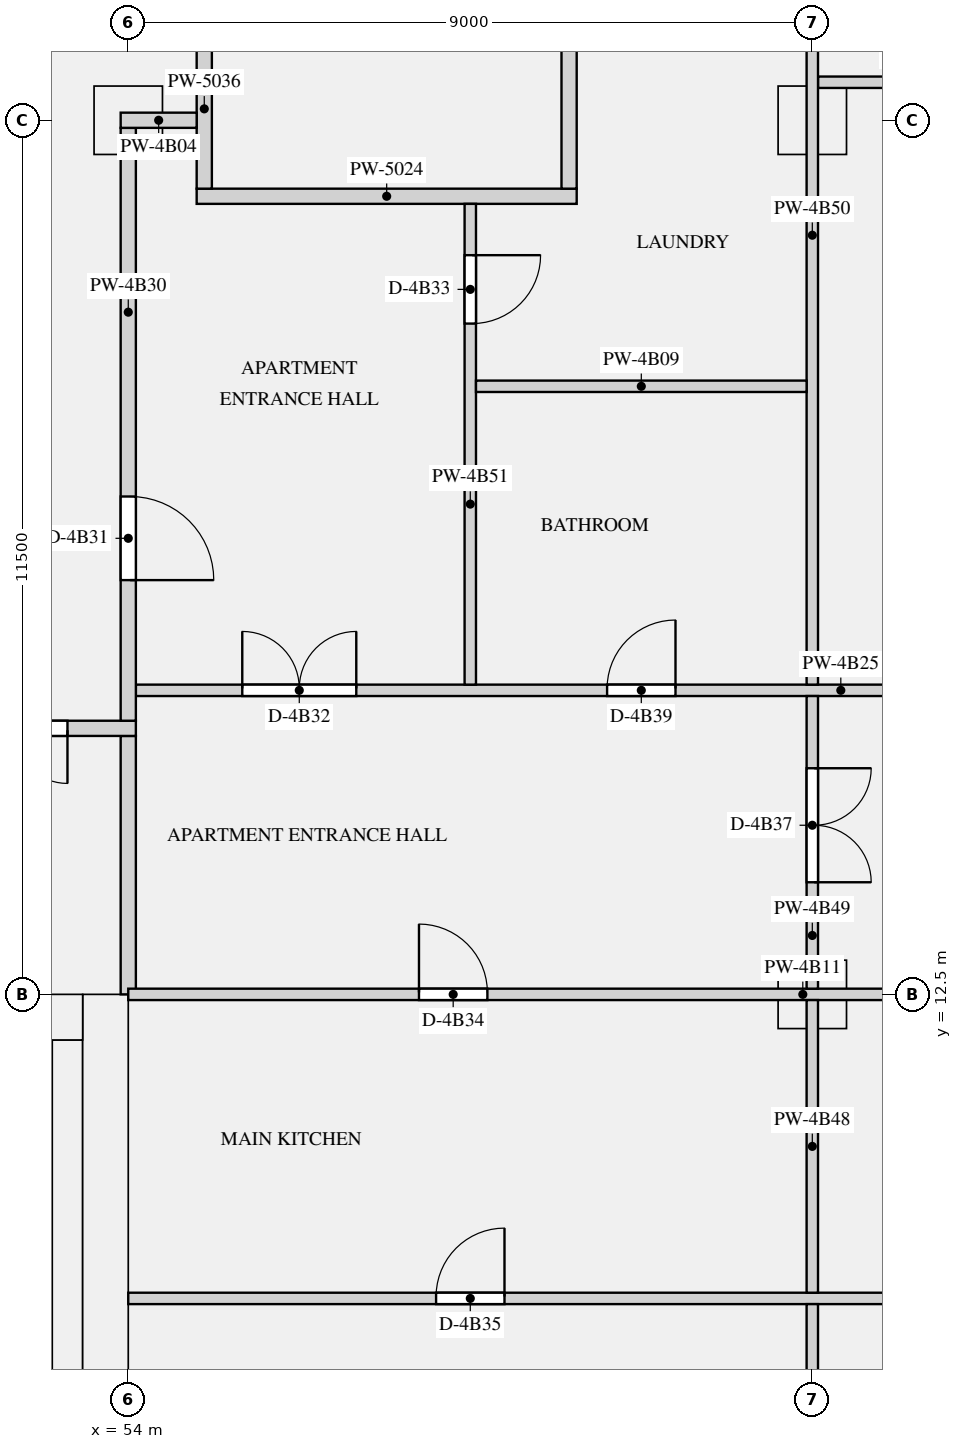
"""IFC4 building model, lengths in metres.
Left out: names, types, materials, properties, quantities, classifications, styles, units other than length and angle.
Written with IfcOpenShell. Run it as: python <this file> out.ifc"""

import sys

from ifc_helpers import new_model, si_unit, direction, frame, frame_2d, origin, origin_2d, place, context, subcontext, project, spatial, rectangle, extrude, element, fill, save


model = new_model("IFC4")
c1 = context("Model", 3, precision=1e-05, world=origin(), true_north=direction((0.0, 1.0)))
c2 = subcontext(c1, "Body", "Model", "MODEL_VIEW")
j1 = project(units=[si_unit("LENGTHUNIT", "METRE"), si_unit("PLANEANGLEUNIT", "RADIAN")], contexts=[c1])
p1 = place(None, origin())
s1 = spatial("IfcSite", under=j1, at=p1, CompositionType="ELEMENT")
p2 = place(p1, origin())
s2 = spatial("IfcBuilding", under=s1, at=p2, CompositionType="ELEMENT")
p3 = place(p2, frame((0.0, 0.0, 207.45)))
s3 = spatial("IfcBuildingStorey", under=s2, at=p3, CompositionType="ELEMENT", Elevation=207.45)
for number, where, z_axis, x_axis in (
    (1, (54.0, 24.0, 0.0), (0.0, 0.0, 1.0), (1.0, 0.0, 0.0)),
    (2, (63.0, 24.0, 0.0), (0.0, 0.0, 1.0), (1.0, 0.0, 0.0)),
    (3, (63.0, 12.5, 0.0), (0.0, 0.0, 1.0), (1.0, 0.0, 0.0)),
):
    element("IfcColumn", number, at=place(p3, frame(where, z_axis=z_axis, x_axis=x_axis)), inside=s3, PredefinedType="COLUMN", context=c2, shape_type="SweptSolid", body=[
        extrude(rectangle(XDim=0.9, YDim=0.9, at=origin_2d()), origin(), (0.0, 0.0, 1.0), 3.15),
    ])
p4 = place(p3, frame((53.7, 0.0, 0.0), z_axis=(0.0, 0.0, 1.0), x_axis=(0.0, 1.0, 0.0)))
e4 = element("IfcWall", 4, at=p4, inside=s3, PredefinedType="SHEAR", context=c2, shape_type="SweptSolid", body=[
    extrude(rectangle(XDim=12.5, YDim=0.6, at=frame_2d((6.25, 0.0))), origin(), (0.0, 0.0, 1.0), 3.15),
])
p5 = place(p3, frame((18.6, 12.2, 0.0), z_axis=(0.0, 0.0, 1.0), x_axis=(1.0, 0.0, 0.0)))
e5 = element("IfcWall", 5, at=p5, inside=s3, PredefinedType="SHEAR", context=c2, shape_type="SweptSolid", body=[
    extrude(rectangle(XDim=34.8, YDim=0.6, at=frame_2d((17.4, 0.0))), origin(), (0.0, 0.0, 1.0), 3.15),
])
p6 = place(p5, frame((24.575, 0.0, 0.0)))
e6 = element("IfcOpeningElement", 6, at=p6, cuts=e5, PredefinedType="OPENING", context=c2, shape_type="SweptSolid", body=[
    extrude(rectangle(XDim=1.1, YDim=2.1, at=frame_2d((0.55, 1.05))), frame((0.0, 0.31, 0.0), z_axis=(0.0, -1.0, 0.0), x_axis=(1.0, 0.0, 0.0)), (0.0, 0.0, 1.0), 0.62),
])
p7 = place(p5, frame((26.825, 0.0, 0.0)))
e7 = element("IfcOpeningElement", 7, at=p7, cuts=e5, PredefinedType="OPENING", context=c2, shape_type="SweptSolid", body=[
    extrude(rectangle(XDim=1.1, YDim=2.1, at=frame_2d((0.55, 1.05))), frame((0.0, 0.31, 0.0), z_axis=(0.0, -1.0, 0.0), x_axis=(1.0, 0.0, 0.0)), (0.0, 0.0, 1.0), 0.62),
])
p8 = place(p5, frame((29.075, 0.0, 0.0)))
e8 = element("IfcOpeningElement", 8, at=p8, cuts=e5, PredefinedType="OPENING", context=c2, shape_type="SweptSolid", body=[
    extrude(rectangle(XDim=1.1, YDim=2.1, at=frame_2d((0.55, 1.05))), frame((0.0, 0.31, 0.0), z_axis=(0.0, -1.0, 0.0), x_axis=(1.0, 0.0, 0.0)), (0.0, 0.0, 1.0), 0.62),
])
p9 = place(p5, frame((4.95, 0.0, 0.0)))
e9 = element("IfcOpeningElement", 9, at=p9, cuts=e5, PredefinedType="OPENING", context=c2, shape_type="SweptSolid", body=[
    extrude(rectangle(XDim=0.9, YDim=2.1, at=frame_2d((0.45, 1.05))), frame((0.0, 0.31, 0.0), z_axis=(0.0, -1.0, 0.0), x_axis=(1.0, 0.0, 0.0)), (0.0, 0.0, 1.0), 0.62),
])
p10 = place(p5, frame((13.95, 0.0, 0.0)))
e10 = element("IfcOpeningElement", 10, at=p10, cuts=e5, PredefinedType="OPENING", context=c2, shape_type="SweptSolid", body=[
    extrude(rectangle(XDim=0.9, YDim=2.1, at=frame_2d((0.45, 1.05))), frame((0.0, 0.31, 0.0), z_axis=(0.0, -1.0, 0.0), x_axis=(1.0, 0.0, 0.0)), (0.0, 0.0, 1.0), 0.62),
])
p11 = place(p5, frame((18.45, 0.0, 0.0)))
e11 = element("IfcOpeningElement", 11, at=p11, cuts=e5, PredefinedType="OPENING", context=c2, shape_type="SweptSolid", body=[
    extrude(rectangle(XDim=0.9, YDim=2.1, at=frame_2d((0.45, 1.05))), frame((0.0, 0.31, 0.0), z_axis=(0.0, -1.0, 0.0), x_axis=(1.0, 0.0, 0.0)), (0.0, 0.0, 1.0), 0.62),
])
p12 = place(p5, frame((1.55, 0.0, 0.0)))
e12 = element("IfcOpeningElement", 12, at=p12, cuts=e5, PredefinedType="OPENING", context=c2, shape_type="SweptSolid", body=[
    extrude(rectangle(XDim=1.2, YDim=2.1, at=frame_2d((0.6, 1.05))), frame((0.0, 0.31, 0.0), z_axis=(0.0, -1.0, 0.0), x_axis=(1.0, 0.0, 0.0)), (0.0, 0.0, 1.0), 0.62),
])
p13 = place(p5, frame((32.05, 0.0, 0.0)))
e13 = element("IfcOpeningElement", 13, at=p13, cuts=e5, PredefinedType="OPENING", context=c2, shape_type="SweptSolid", body=[
    extrude(rectangle(XDim=1.2, YDim=2.1, at=frame_2d((0.6, 1.05))), frame((0.0, 0.31, 0.0), z_axis=(0.0, -1.0, 0.0), x_axis=(1.0, 0.0, 0.0)), (0.0, 0.0, 1.0), 0.62),
])
p14 = place(p3, frame((53.2, 1.0, 0.0), z_axis=(0.0, 0.0, 1.0), x_axis=(0.0, 1.0, 0.0)))
e14 = element("IfcWall", 14, at=p14, inside=s3, PredefinedType="SHEAR", context=c2, shape_type="SweptSolid", body=[
    extrude(rectangle(XDim=10.9, YDim=0.4, at=frame_2d((5.45, 0.0))), origin(), (0.0, 0.0, 1.0), 3.15),
])
p15 = place(p3, frame((54.9, 23.0, 0.0), z_axis=(0.0, 0.0, 1.0), x_axis=(1.0, 0.0, 0.0)))
e15 = element("IfcWall", 15, at=p15, inside=s3, PredefinedType="PARTITIONING", context=c2, shape_type="SweptSolid", body=[
    extrude(rectangle(XDim=5.0, YDim=0.2, at=frame_2d((2.5, 0.0))), origin(), (0.0, 0.0, 1.0), 2.83),
])
p16 = place(p3, frame((54.0, 12.5, 0.0), z_axis=(0.0, 0.0, 1.0), x_axis=(0.0, 1.0, 0.0)))
e16 = element("IfcWall", 16, at=p16, inside=s3, PredefinedType="PARTITIONING", context=c2, shape_type="SweptSolid", body=[
    extrude(rectangle(XDim=3.4, YDim=0.2, at=frame_2d((1.7, 0.0))), origin(), (0.0, 0.0, 1.0), 2.83),
])
p17 = place(p3, frame((55.0, 23.1, 0.0), z_axis=(0.0, 0.0, 1.0), x_axis=(0.0, 1.0, 0.0)))
e17 = element("IfcWall", 17, at=p17, inside=s3, PredefinedType="PARTITIONING", context=c2, shape_type="SweptSolid", body=[
    extrude(rectangle(XDim=3.8, YDim=0.2, at=frame_2d((1.9, 0.0))), origin(), (0.0, 0.0, 1.0), 2.83),
])
p18 = place(p17, frame((2.1, 0.0, 0.0)))
e18 = element("IfcOpeningElement", 18, at=p18, cuts=e17, PredefinedType="OPENING", context=c2, shape_type="SweptSolid", body=[
    extrude(rectangle(XDim=1.2, YDim=2.1, at=frame_2d((0.6, 1.05))), frame((0.0, 0.11, 0.0), z_axis=(0.0, -1.0, 0.0), x_axis=(1.0, 0.0, 0.0)), (0.0, 0.0, 1.0), 0.22),
])
p19 = place(p3, frame((59.8, 23.1, 0.0), z_axis=(0.0, 0.0, 1.0), x_axis=(0.0, 1.0, 0.0)))
e19 = element("IfcWall", 19, at=p19, inside=s3, PredefinedType="PARTITIONING", context=c2, shape_type="SweptSolid", body=[
    extrude(rectangle(XDim=3.9, YDim=0.2, at=frame_2d((1.95, 0.0))), origin(), (0.0, 0.0, 1.0), 2.83),
])
p20 = place(p3, frame((53.9, 24.0, 0.0), z_axis=(0.0, 0.0, 1.0), x_axis=(1.0, 0.0, 0.0)))
e20 = element("IfcWall", 20, at=p20, inside=s3, PredefinedType="PARTITIONING", context=c2, shape_type="SweptSolid", body=[
    extrude(rectangle(XDim=1.0, YDim=0.2, at=frame_2d((0.5, 0.0))), origin(), (0.0, 0.0, 1.0), 2.83),
])
p21 = place(p3, frame((58.575, 20.5, 0.0), z_axis=(0.0, 0.0, 1.0), x_axis=(1.0, 0.0, 0.0)))
e21 = element("IfcWall", 21, at=p21, inside=s3, PredefinedType="PARTITIONING", context=c2, shape_type="SweptSolid", body=[
    extrude(rectangle(XDim=4.35, YDim=0.15, at=frame_2d((2.175, 0.0))), origin(), (0.0, 0.0, 1.0), 2.83),
])
p22 = place(p3, frame((54.0, 12.5, 0.0), z_axis=(0.0, 0.0, 1.0), x_axis=(1.0, 0.0, 0.0)))
e22 = element("IfcWall", 22, at=p22, inside=s3, PredefinedType="PARTITIONING", context=c2, shape_type="SweptSolid", body=[
    extrude(rectangle(XDim=17.35, YDim=0.15, at=frame_2d((8.675, 0.0))), origin(), (0.0, 0.0, 1.0), 2.83),
])
p23 = place(p22, frame((3.825, 0.0, 0.0)))
e23 = element("IfcOpeningElement", 23, at=p23, cuts=e22, PredefinedType="OPENING", context=c2, shape_type="SweptSolid", body=[
    extrude(rectangle(XDim=0.9, YDim=2.1, at=frame_2d((0.45, 1.05))), frame((0.0, 0.085, 0.0), z_axis=(0.0, -1.0, 0.0), x_axis=(1.0, 0.0, 0.0)), (0.0, 0.0, 1.0), 0.17),
])
p24 = place(p22, frame((13.025, 0.0, 0.0)))
e24 = element("IfcOpeningElement", 24, at=p24, cuts=e22, PredefinedType="OPENING", context=c2, shape_type="SweptSolid", body=[
    extrude(rectangle(XDim=0.9, YDim=2.1, at=frame_2d((0.45, 1.05))), frame((0.0, 0.085, 0.0), z_axis=(0.0, -1.0, 0.0), x_axis=(1.0, 0.0, 0.0)), (0.0, 0.0, 1.0), 0.17),
])
p25 = place(p3, frame((54.0, 8.5, 0.0), z_axis=(0.0, 0.0, 1.0), x_axis=(1.0, 0.0, 0.0)))
e25 = element("IfcWall", 25, at=p25, inside=s3, PredefinedType="PARTITIONING", context=c2, shape_type="SweptSolid", body=[
    extrude(rectangle(XDim=17.35, YDim=0.15, at=frame_2d((8.675, 0.0))), origin(), (0.0, 0.0, 1.0), 2.83),
])
p26 = place(p25, frame((4.05, 0.0, 0.0)))
e26 = element("IfcOpeningElement", 26, at=p26, cuts=e25, PredefinedType="OPENING", context=c2, shape_type="SweptSolid", body=[
    extrude(rectangle(XDim=0.9, YDim=2.1, at=frame_2d((0.45, 1.05))), frame((0.0, 0.085, 0.0), z_axis=(0.0, -1.0, 0.0), x_axis=(1.0, 0.0, 0.0)), (0.0, 0.0, 1.0), 0.17),
])
p27 = place(p3, frame((54.1, 16.5, 0.0), z_axis=(0.0, 0.0, 1.0), x_axis=(1.0, 0.0, 0.0)))
e27 = element("IfcWall", 27, at=p27, inside=s3, PredefinedType="PARTITIONING", context=c2, shape_type="SweptSolid", body=[
    extrude(rectangle(XDim=14.75, YDim=0.15, at=frame_2d((7.375, 0.0))), origin(), (0.0, 0.0, 1.0), 2.83),
])
p28 = place(p27, frame((1.4, 0.0, 0.0)))
e28 = element("IfcOpeningElement", 28, at=p28, cuts=e27, PredefinedType="OPENING", context=c2, shape_type="SweptSolid", body=[
    extrude(rectangle(XDim=1.5, YDim=2.1, at=frame_2d((0.75, 1.05))), frame((0.0, 0.085, 0.0), z_axis=(0.0, -1.0, 0.0), x_axis=(1.0, 0.0, 0.0)), (0.0, 0.0, 1.0), 0.17),
])
p29 = place(p27, frame((6.2, 0.0, 0.0)))
e29 = element("IfcOpeningElement", 29, at=p29, cuts=e27, PredefinedType="OPENING", context=c2, shape_type="SweptSolid", body=[
    extrude(rectangle(XDim=0.9, YDim=2.1, at=frame_2d((0.45, 1.05))), frame((0.0, 0.085, 0.0), z_axis=(0.0, -1.0, 0.0), x_axis=(1.0, 0.0, 0.0)), (0.0, 0.0, 1.0), 0.17),
])
p30 = place(p27, frame((11.45, 0.0, 0.0)))
e30 = element("IfcOpeningElement", 30, at=p30, cuts=e27, PredefinedType="OPENING", context=c2, shape_type="SweptSolid", body=[
    extrude(rectangle(XDim=0.9, YDim=2.1, at=frame_2d((0.45, 1.05))), frame((0.0, 0.085, 0.0), z_axis=(0.0, -1.0, 0.0), x_axis=(1.0, 0.0, 0.0)), (0.0, 0.0, 1.0), 0.17),
])
p31 = place(p3, frame((63.075, 24.5, 0.0), z_axis=(0.0, 0.0, 1.0), x_axis=(1.0, 0.0, 0.0)))
e31 = element("IfcWall", 31, at=p31, inside=s3, PredefinedType="PARTITIONING", context=c2, shape_type="SweptSolid", body=[
    extrude(rectangle(XDim=5.775, YDim=0.15, at=frame_2d((2.888, 0.0))), origin(), (0.0, 0.0, 1.0), 2.83),
])
p32 = place(p31, frame((2.7, 0.0, 0.0)))
e32 = element("IfcOpeningElement", 32, at=p32, cuts=e31, PredefinedType="OPENING", context=c2, shape_type="SweptSolid", body=[
    extrude(rectangle(XDim=0.9, YDim=2.1, at=frame_2d((0.45, 1.05))), frame((0.0, 0.085, 0.0), z_axis=(0.0, -1.0, 0.0), x_axis=(1.0, 0.0, 0.0)), (0.0, 0.0, 1.0), 0.17),
])
p33 = place(p3, frame((17.9, 16.0, 0.0), z_axis=(0.0, 0.0, 1.0), x_axis=(1.0, 0.0, 0.0)))
e33 = element("IfcWall", 33, at=p33, inside=s3, PredefinedType="PARTITIONING", context=c2, shape_type="SweptSolid", body=[
    extrude(rectangle(XDim=36.2, YDim=0.2, at=frame_2d((18.1, 0.0))), origin(), (0.0, 0.0, 1.0), 2.83),
])
p34 = place(p33, frame((0.9, 0.0, 0.0)))
e34 = element("IfcOpeningElement", 34, at=p34, cuts=e33, PredefinedType="OPENING", context=c2, shape_type="SweptSolid", body=[
    extrude(rectangle(XDim=1.4, YDim=2.1, at=frame_2d((0.7, 1.05))), frame((0.0, 0.11, 0.0), z_axis=(0.0, -1.0, 0.0), x_axis=(1.0, 0.0, 0.0)), (0.0, 0.0, 1.0), 0.22),
])
p35 = place(p33, frame((33.9, 0.0, 0.0)))
e35 = element("IfcOpeningElement", 35, at=p35, cuts=e33, PredefinedType="OPENING", context=c2, shape_type="SweptSolid", body=[
    extrude(rectangle(XDim=1.4, YDim=2.1, at=frame_2d((0.7, 1.05))), frame((0.0, 0.11, 0.0), z_axis=(0.0, -1.0, 0.0), x_axis=(1.0, 0.0, 0.0)), (0.0, 0.0, 1.0), 0.22),
])
p36 = place(p3, frame((54.0, 16.1, 0.0), z_axis=(0.0, 0.0, 1.0), x_axis=(0.0, 1.0, 0.0)))
e36 = element("IfcWall", 36, at=p36, inside=s3, PredefinedType="PARTITIONING", context=c2, shape_type="SweptSolid", body=[
    extrude(rectangle(XDim=7.8, YDim=0.2, at=frame_2d((3.9, 0.0))), origin(), (0.0, 0.0, 1.0), 2.83),
])
p37 = place(p36, frame((1.85, 0.0, 0.0)))
e37 = element("IfcOpeningElement", 37, at=p37, cuts=e36, PredefinedType="OPENING", context=c2, shape_type="SweptSolid", body=[
    extrude(rectangle(XDim=1.1, YDim=2.1, at=frame_2d((0.55, 1.05))), frame((0.0, 0.11, 0.0), z_axis=(0.0, -1.0, 0.0), x_axis=(1.0, 0.0, 0.0)), (0.0, 0.0, 1.0), 0.22),
])
p38 = place(p3, frame((63.0, 0.65, 0.0), z_axis=(0.0, 0.0, 1.0), x_axis=(0.0, 1.0, 0.0)))
e38 = element("IfcWall", 38, at=p38, inside=s3, PredefinedType="PARTITIONING", context=c2, shape_type="SweptSolid", body=[
    extrude(rectangle(XDim=7.775, YDim=0.15, at=frame_2d((3.888, 0.0))), origin(), (0.0, 0.0, 1.0), 2.83),
])
p39 = place(p38, frame((3.1, 0.0, 0.0)))
e39 = element("IfcOpeningElement", 39, at=p39, cuts=e38, PredefinedType="OPENING", context=c2, shape_type="SweptSolid", body=[
    extrude(rectangle(XDim=1.5, YDim=2.1, at=frame_2d((0.75, 1.05))), frame((0.0, 0.085, 0.0), z_axis=(0.0, -1.0, 0.0), x_axis=(1.0, 0.0, 0.0)), (0.0, 0.0, 1.0), 0.17),
])
p40 = place(p3, frame((63.0, 8.575, 0.0), z_axis=(0.0, 0.0, 1.0), x_axis=(0.0, 1.0, 0.0)))
e40 = element("IfcWall", 40, at=p40, inside=s3, PredefinedType="PARTITIONING", context=c2, shape_type="SweptSolid", body=[
    extrude(rectangle(XDim=3.85, YDim=0.15, at=frame_2d((1.925, 0.0))), origin(), (0.0, 0.0, 1.0), 2.83),
])
p41 = place(p3, frame((63.0, 12.575, 0.0), z_axis=(0.0, 0.0, 1.0), x_axis=(0.0, 1.0, 0.0)))
e41 = element("IfcWall", 41, at=p41, inside=s3, PredefinedType="PARTITIONING", context=c2, shape_type="SweptSolid", body=[
    extrude(rectangle(XDim=3.85, YDim=0.15, at=frame_2d((1.925, 0.0))), origin(), (0.0, 0.0, 1.0), 2.83),
])
p42 = place(p41, frame((1.4, 0.0, 0.0)))
e42 = element("IfcOpeningElement", 42, at=p42, cuts=e41, PredefinedType="OPENING", context=c2, shape_type="SweptSolid", body=[
    extrude(rectangle(XDim=1.5, YDim=2.1, at=frame_2d((0.75, 1.05))), frame((0.0, 0.085, 0.0), z_axis=(0.0, -1.0, 0.0), x_axis=(1.0, 0.0, 0.0)), (0.0, 0.0, 1.0), 0.17),
])
p43 = place(p3, frame((63.0, 16.575, 0.0), z_axis=(0.0, 0.0, 1.0), x_axis=(0.0, 1.0, 0.0)))
e43 = element("IfcWall", 43, at=p43, inside=s3, PredefinedType="PARTITIONING", context=c2, shape_type="SweptSolid", body=[
    extrude(rectangle(XDim=11.825, YDim=0.15, at=frame_2d((5.913, 0.0))), origin(), (0.0, 0.0, 1.0), 2.83),
])
p44 = place(p3, frame((58.5, 16.575, 0.0), z_axis=(0.0, 0.0, 1.0), x_axis=(0.0, 1.0, 0.0)))
e44 = element("IfcWall", 44, at=p44, inside=s3, PredefinedType="PARTITIONING", context=c2, shape_type="SweptSolid", body=[
    extrude(rectangle(XDim=6.325, YDim=0.15, at=frame_2d((3.163, 0.0))), origin(), (0.0, 0.0, 1.0), 2.83),
])
p45 = place(p44, frame((4.75, 0.0, 0.0)))
e45 = element("IfcOpeningElement", 45, at=p45, cuts=e44, PredefinedType="OPENING", context=c2, shape_type="SweptSolid", body=[
    extrude(rectangle(XDim=0.9, YDim=2.1, at=frame_2d((0.45, 1.05))), frame((0.0, 0.085, 0.0), z_axis=(0.0, -1.0, 0.0), x_axis=(1.0, 0.0, 0.0)), (0.0, 0.0, 1.0), 0.17),
])
p46 = place(p35, frame((1.4, 0.0, 0.0), z_axis=(0.0, 0.0, 1.0), x_axis=(-1.0, 0.0, 0.0)))
e46 = element("IfcDoor", 46, at=p46, inside=s3, OperationType="DOUBLE_DOOR_SINGLE_SWING", PredefinedType="DOOR", context=c2, shape_type="SweptSolid", body=[
    extrude(rectangle(XDim=1.4, YDim=2.1, at=frame_2d((0.7, 1.05))), frame((0.0, 0.025, 0.0), z_axis=(0.0, -1.0, 0.0), x_axis=(1.0, 0.0, 0.0)), (0.0, 0.0, 1.0), 0.05),
])
fill(e35, e46)
p47 = place(p37, frame((1.1, 0.0, 0.0), z_axis=(0.0, 0.0, 1.0), x_axis=(-1.0, 0.0, 0.0)))
e47 = element("IfcDoor", 47, at=p47, inside=s3, OperationType="SINGLE_SWING_RIGHT", PredefinedType="DOOR", context=c2, shape_type="SweptSolid", body=[
    extrude(rectangle(XDim=1.1, YDim=2.1, at=frame_2d((0.55, 1.05))), frame((0.0, 0.025, 0.0), z_axis=(0.0, -1.0, 0.0), x_axis=(1.0, 0.0, 0.0)), (0.0, 0.0, 1.0), 0.05),
])
fill(e37, e47)
p48 = place(p28, origin())
e48 = element("IfcDoor", 48, at=p48, inside=s3, OperationType="DOUBLE_DOOR_SINGLE_SWING", PredefinedType="DOOR", context=c2, shape_type="SweptSolid", body=[
    extrude(rectangle(XDim=1.5, YDim=2.1, at=frame_2d((0.75, 1.05))), frame((0.0, 0.025, 0.0), z_axis=(0.0, -1.0, 0.0), x_axis=(1.0, 0.0, 0.0)), (0.0, 0.0, 1.0), 0.05),
])
fill(e28, e48)
p49 = place(p45, frame((0.9, 0.0, 0.0), z_axis=(0.0, 0.0, 1.0), x_axis=(-1.0, 0.0, 0.0)))
e49 = element("IfcDoor", 49, at=p49, inside=s3, OperationType="SINGLE_SWING_LEFT", PredefinedType="DOOR", context=c2, shape_type="SweptSolid", body=[
    extrude(rectangle(XDim=0.9, YDim=2.1, at=frame_2d((0.45, 1.05))), frame((0.0, 0.025, 0.0), z_axis=(0.0, -1.0, 0.0), x_axis=(1.0, 0.0, 0.0)), (0.0, 0.0, 1.0), 0.05),
])
fill(e45, e49)
p50 = place(p23, origin())
e50 = element("IfcDoor", 50, at=p50, inside=s3, OperationType="SINGLE_SWING_LEFT", PredefinedType="DOOR", context=c2, shape_type="SweptSolid", body=[
    extrude(rectangle(XDim=0.9, YDim=2.1, at=frame_2d((0.45, 1.05))), frame((0.0, 0.025, 0.0), z_axis=(0.0, -1.0, 0.0), x_axis=(1.0, 0.0, 0.0)), (0.0, 0.0, 1.0), 0.05),
])
fill(e23, e50)
p51 = place(p26, origin())
e51 = element("IfcDoor", 51, at=p51, inside=s3, OperationType="SINGLE_SWING_RIGHT", PredefinedType="DOOR", context=c2, shape_type="SweptSolid", body=[
    extrude(rectangle(XDim=0.9, YDim=2.1, at=frame_2d((0.45, 1.05))), frame((0.0, 0.025, 0.0), z_axis=(0.0, -1.0, 0.0), x_axis=(1.0, 0.0, 0.0)), (0.0, 0.0, 1.0), 0.05),
])
fill(e26, e51)
p52 = place(p42, frame((1.5, 0.0, 0.0), z_axis=(0.0, 0.0, 1.0), x_axis=(-1.0, 0.0, 0.0)))
e52 = element("IfcDoor", 52, at=p52, inside=s3, OperationType="DOUBLE_DOOR_SINGLE_SWING", PredefinedType="DOOR", context=c2, shape_type="SweptSolid", body=[
    extrude(rectangle(XDim=1.5, YDim=2.1, at=frame_2d((0.75, 1.05))), frame((0.0, 0.025, 0.0), z_axis=(0.0, -1.0, 0.0), x_axis=(1.0, 0.0, 0.0)), (0.0, 0.0, 1.0), 0.05),
])
fill(e42, e52)
p53 = place(p29, origin())
e53 = element("IfcDoor", 53, at=p53, inside=s3, OperationType="SINGLE_SWING_RIGHT", PredefinedType="DOOR", context=c2, shape_type="SweptSolid", body=[
    extrude(rectangle(XDim=0.9, YDim=2.1, at=frame_2d((0.45, 1.05))), frame((0.0, 0.025, 0.0), z_axis=(0.0, -1.0, 0.0), x_axis=(1.0, 0.0, 0.0)), (0.0, 0.0, 1.0), 0.05),
])
fill(e29, e53)
save(model, sys.argv[1])
